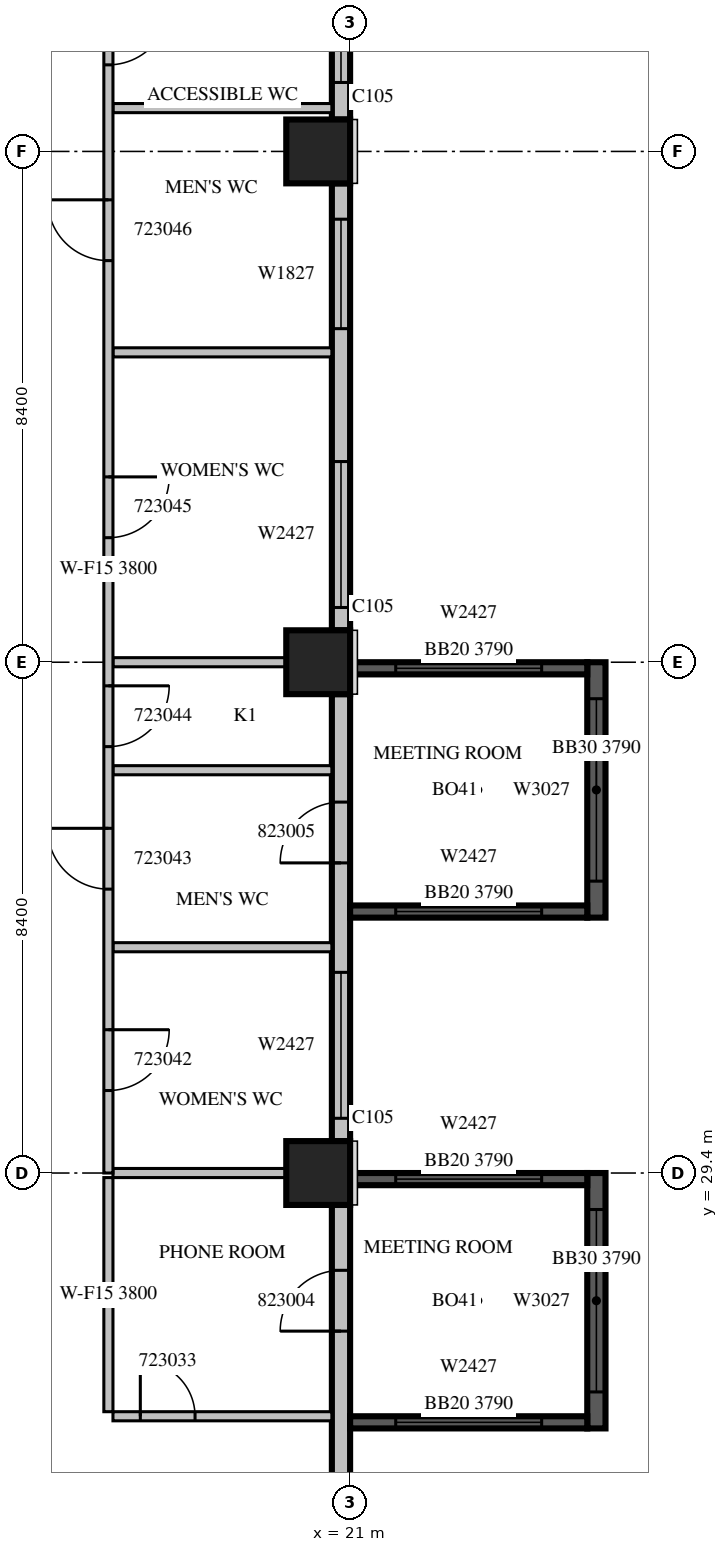
"""IFC4 building model, lengths in metres.
Left out: names, types, materials, properties, quantities, classifications, styles, units other than length and angle.
Written with IfcOpenShell. Run it as: python <this file> out.ifc"""

import sys

from ifc_helpers import new_model, si_unit, direction, frame, frame_2d, origin, origin_2d, place, context, subcontext, project, spatial, rectangle, extrude, source, transform, mapped, element, fill, save


model = new_model("IFC4")
c1 = context("Model", 3, precision=1e-05, world=origin(), true_north=direction((0.0, 1.0)))
c2 = subcontext(c1, "Body", "Model", "MODEL_VIEW")
j1 = project(units=[si_unit("LENGTHUNIT", "METRE"), si_unit("PLANEANGLEUNIT", "RADIAN")], contexts=[c1])
p1 = place(None, origin())
s1 = spatial("IfcSite", under=j1, at=p1, CompositionType="ELEMENT")
p2 = place(p1, origin())
s2 = spatial("IfcBuilding", under=s1, at=p2, CompositionType="ELEMENT")
p3 = place(p2, frame((0.0, 0.0, 107.7)))
s3 = spatial("IfcBuildingStorey", under=s2, at=p3, CompositionType="ELEMENT", Elevation=107.7)
m1 = source(origin(), c2, "Body", "SweptSolid", [
    extrude(rectangle(XDim=1.05, YDim=1.05, at=origin_2d()), origin(), (0.0, 0.0, 1.0), 4.2),
])
for number, where, z_axis, x_axis in (
    (1, (20.475, 29.4, 0.0), (0.0, 0.0, 1.0), (1.0, 0.0, 0.0)),
    (2, (20.475, 37.8, 0.0), (0.0, 0.0, 1.0), (1.0, 0.0, 0.0)),
    (3, (20.475, 46.2, 0.0), (0.0, 0.0, 1.0), (1.0, 0.0, 0.0)),
):
    element("IfcColumn", number, at=place(p3, frame(where, z_axis=z_axis, x_axis=x_axis)), inside=s3, PredefinedType="COLUMN", context=c2, shape_type="MappedRepresentation", body=[
        mapped(m1, transform((0.0, 0.0, 0.0), scale=1.0)),
    ])
m2 = source(origin(), c2, "Body", "SweptSolid", [
    extrude(rectangle(XDim=6.875, YDim=0.3, at=frame_2d((3.438, 0.0))), origin(), (0.0, 0.0, 1.0), 3.8),
])
p4 = place(p3, frame((20.85, 22.0, 0.0), z_axis=(0.0, 0.0, 1.0), x_axis=(0.0, 1.0, 0.0)))
e4 = element("IfcWall", 4, at=p4, inside=s3, PredefinedType="STANDARD", context=c2, shape_type="MappedRepresentation", body=[
    mapped(m2, transform((0.0, 0.0, 0.0), scale=1.0)),
])
m3 = source(origin(), c2, "Body", "SweptSolid", [
    extrude(rectangle(XDim=1.8, YDim=2.7, at=frame_2d((0.9, 1.35))), frame((0.0, 0.16, 0.0), z_axis=(0.0, -1.0, 0.0), x_axis=(1.0, 0.0, 0.0)), (0.0, 0.0, 1.0), 0.32),
])
p5 = place(p4, frame((0.2, 0.0, 0.6)))
e5 = element("IfcOpeningElement", 5, at=p5, cuts=e4, PredefinedType="OPENING", context=c2, shape_type="MappedRepresentation", body=[
    mapped(m3, transform((0.0, 0.0, 0.0), scale=1.0)),
])
m4 = source(origin(), c2, "Body", "SweptSolid", [
    extrude(rectangle(XDim=1.0, YDim=2.1, at=frame_2d((0.5, 1.05))), frame((0.0, 0.16, 0.0), z_axis=(0.0, -1.0, 0.0), x_axis=(1.0, 0.0, 0.0)), (0.0, 0.0, 1.0), 0.32),
])
p6 = place(p4, frame((4.8, 0.0, 0.0)))
e6 = element("IfcOpeningElement", 6, at=p6, cuts=e4, PredefinedType="OPENING", context=c2, shape_type="MappedRepresentation", body=[
    mapped(m4, transform((0.0, 0.0, 0.0), scale=1.0)),
])
m5 = source(origin(), c2, "Body", "SweptSolid", [
    extrude(rectangle(XDim=7.35, YDim=0.3, at=frame_2d((3.675, 0.0))), origin(), (0.0, 0.0, 1.0), 3.8),
])
p7 = place(p3, frame((20.85, 29.925, 0.0), z_axis=(0.0, 0.0, 1.0), x_axis=(0.0, 1.0, 0.0)))
e7 = element("IfcWall", 7, at=p7, inside=s3, PredefinedType="STANDARD", context=c2, shape_type="MappedRepresentation", body=[
    mapped(m5, transform((0.0, 0.0, 0.0), scale=1.0)),
])
m6 = source(origin(), c2, "Body", "SweptSolid", [
    extrude(rectangle(XDim=2.4, YDim=2.7, at=frame_2d((1.2, 1.35))), frame((0.0, 0.16, 0.0), z_axis=(0.0, -1.0, 0.0), x_axis=(1.0, 0.0, 0.0)), (0.0, 0.0, 1.0), 0.32),
])
p8 = place(p7, frame((0.375, 0.0, 0.6)))
e8 = element("IfcOpeningElement", 8, at=p8, cuts=e7, PredefinedType="OPENING", context=c2, shape_type="MappedRepresentation", body=[
    mapped(m6, transform((0.0, 0.0, 0.0), scale=1.0)),
])
p9 = place(p7, frame((4.575, 0.0, 0.0)))
e9 = element("IfcOpeningElement", 9, at=p9, cuts=e7, PredefinedType="OPENING", context=c2, shape_type="MappedRepresentation", body=[
    mapped(m4, transform((0.0, 0.0, 0.0), scale=1.0)),
])
p10 = place(p3, frame((20.85, 38.325, 0.0), z_axis=(0.0, 0.0, 1.0), x_axis=(0.0, 1.0, 0.0)))
e10 = element("IfcWall", 10, at=p10, inside=s3, PredefinedType="STANDARD", context=c2, shape_type="MappedRepresentation", body=[
    mapped(m5, transform((0.0, 0.0, 0.0), scale=1.0)),
])
p11 = place(p10, frame((0.375, 0.0, 0.6)))
e11 = element("IfcOpeningElement", 11, at=p11, cuts=e10, PredefinedType="OPENING", context=c2, shape_type="MappedRepresentation", body=[
    mapped(m6, transform((0.0, 0.0, 0.0), scale=1.0)),
])
p12 = place(p10, frame((4.96, 0.0, 0.6)))
e12 = element("IfcOpeningElement", 12, at=p12, cuts=e10, PredefinedType="OPENING", context=c2, shape_type="MappedRepresentation", body=[
    mapped(m3, transform((0.0, 0.0, 0.0), scale=1.0)),
])
m7 = source(origin(), c2, "Body", "SweptSolid", [
    extrude(rectangle(XDim=2.835, YDim=0.3, at=frame_2d((1.417, 0.0))), origin(), (0.0, 0.0, 1.0), 3.8),
])
p13 = place(p3, frame((20.85, 46.725, 0.0), z_axis=(0.0, 0.0, 1.0), x_axis=(0.0, 1.0, 0.0)))
e13 = element("IfcWall", 13, at=p13, inside=s3, PredefinedType="STANDARD", context=c2, shape_type="MappedRepresentation", body=[
    mapped(m7, transform((0.0, 0.0, 0.0), scale=1.0)),
])
m8 = source(origin(), c2, "Body", "SweptSolid", [
    extrude(rectangle(XDim=1.2, YDim=2.7, at=frame_2d((0.6, 1.35))), frame((0.0, 0.16, 0.0), z_axis=(0.0, -1.0, 0.0), x_axis=(1.0, 0.0, 0.0)), (0.0, 0.0, 1.0), 0.32),
])
p14 = place(p13, frame((0.609, 0.0, 0.6)))
e14 = element("IfcOpeningElement", 14, at=p14, cuts=e13, PredefinedType="OPENING", context=c2, shape_type="MappedRepresentation", body=[
    mapped(m8, transform((0.0, 0.0, 0.0), scale=1.0)),
])
m9 = source(origin(), c2, "Body", "SweptSolid", [
    extrude(rectangle(XDim=4.2, YDim=0.3, at=frame_2d((2.1, 0.0))), origin(), (0.0, 0.0, 1.0), 3.79),
])
p15 = place(p3, frame((25.05, 25.2, 0.0), z_axis=(0.0, 0.0, 1.0), x_axis=(0.0, 1.0, 0.0)))
e15 = element("IfcWall", 15, at=p15, inside=s3, PredefinedType="SOLIDWALL", context=c2, shape_type="MappedRepresentation", body=[
    mapped(m9, transform((0.0, 0.0, 0.0), scale=1.0)),
])
m10 = source(origin(), c2, "Body", "SweptSolid", [
    extrude(rectangle(XDim=3.0, YDim=2.7, at=frame_2d((1.5, 1.35))), frame((0.0, 0.16, 0.0), z_axis=(0.0, -1.0, 0.0), x_axis=(1.0, 0.0, 0.0)), (0.0, 0.0, 1.0), 0.32),
])
p16 = place(p15, frame((0.6, 0.0, 0.6)))
e16 = element("IfcOpeningElement", 16, at=p16, cuts=e15, PredefinedType="OPENING", context=c2, shape_type="MappedRepresentation", body=[
    mapped(m10, transform((0.0, 0.0, 0.0), scale=1.0)),
])
m11 = source(origin(), c2, "Body", "SweptSolid", [
    extrude(rectangle(XDim=3.9, YDim=0.2, at=frame_2d((1.95, 0.0))), origin(), (0.0, 0.0, 1.0), 3.79),
])
p17 = place(p3, frame((21.0, 25.3, 0.0), z_axis=(0.0, 0.0, 1.0), x_axis=(1.0, 0.0, 0.0)))
e17 = element("IfcWall", 17, at=p17, inside=s3, PredefinedType="SOLIDWALL", context=c2, shape_type="MappedRepresentation", body=[
    mapped(m11, transform((0.0, 0.0, 0.0), scale=1.0)),
])
m12 = source(origin(), c2, "Body", "SweptSolid", [
    extrude(rectangle(XDim=2.4, YDim=2.7, at=frame_2d((1.2, 1.35))), frame((0.0, 0.11, 0.0), z_axis=(0.0, -1.0, 0.0), x_axis=(1.0, 0.0, 0.0)), (0.0, 0.0, 1.0), 0.22),
])
p18 = place(p17, frame((0.75, 0.0, 0.6)))
e18 = element("IfcOpeningElement", 18, at=p18, cuts=e17, PredefinedType="OPENING", context=c2, shape_type="MappedRepresentation", body=[
    mapped(m12, transform((0.0, 0.0, 0.0), scale=1.0)),
])
p19 = place(p3, frame((21.0, 29.3, 0.0), z_axis=(0.0, 0.0, 1.0), x_axis=(1.0, 0.0, 0.0)))
e19 = element("IfcWall", 19, at=p19, inside=s3, PredefinedType="SOLIDWALL", context=c2, shape_type="MappedRepresentation", body=[
    mapped(m11, transform((0.0, 0.0, 0.0), scale=1.0)),
])
p20 = place(p19, frame((0.75, 0.0, 0.6)))
e20 = element("IfcOpeningElement", 20, at=p20, cuts=e19, PredefinedType="OPENING", context=c2, shape_type="MappedRepresentation", body=[
    mapped(m12, transform((0.0, 0.0, 0.0), scale=1.0)),
])
p21 = place(p3, frame((25.05, 33.6, 0.0), z_axis=(0.0, 0.0, 1.0), x_axis=(0.0, 1.0, 0.0)))
e21 = element("IfcWall", 21, at=p21, inside=s3, PredefinedType="SOLIDWALL", context=c2, shape_type="MappedRepresentation", body=[
    mapped(m9, transform((0.0, 0.0, 0.0), scale=1.0)),
])
p22 = place(p21, frame((0.6, 0.0, 0.6)))
e22 = element("IfcOpeningElement", 22, at=p22, cuts=e21, PredefinedType="OPENING", context=c2, shape_type="MappedRepresentation", body=[
    mapped(m10, transform((0.0, 0.0, 0.0), scale=1.0)),
])
p23 = place(p3, frame((21.0, 33.7, 0.0), z_axis=(0.0, 0.0, 1.0), x_axis=(1.0, 0.0, 0.0)))
e23 = element("IfcWall", 23, at=p23, inside=s3, PredefinedType="SOLIDWALL", context=c2, shape_type="MappedRepresentation", body=[
    mapped(m11, transform((0.0, 0.0, 0.0), scale=1.0)),
])
p24 = place(p23, frame((0.75, 0.0, 0.6)))
e24 = element("IfcOpeningElement", 24, at=p24, cuts=e23, PredefinedType="OPENING", context=c2, shape_type="MappedRepresentation", body=[
    mapped(m12, transform((0.0, 0.0, 0.0), scale=1.0)),
])
p25 = place(p3, frame((21.0, 37.7, 0.0), z_axis=(0.0, 0.0, 1.0), x_axis=(1.0, 0.0, 0.0)))
e25 = element("IfcWall", 25, at=p25, inside=s3, PredefinedType="SOLIDWALL", context=c2, shape_type="MappedRepresentation", body=[
    mapped(m11, transform((0.0, 0.0, 0.0), scale=1.0)),
])
p26 = place(p25, frame((0.75, 0.0, 0.6)))
e26 = element("IfcOpeningElement", 26, at=p26, cuts=e25, PredefinedType="OPENING", context=c2, shape_type="MappedRepresentation", body=[
    mapped(m12, transform((0.0, 0.0, 0.0), scale=1.0)),
])
m13 = source(origin(), c2, "Body", "SweptSolid", [
    extrude(rectangle(XDim=3.6, YDim=0.15, at=frame_2d((1.8, 0.0))), origin(), (0.0, 0.0, 1.0), 3.8),
])
p27 = place(p3, frame((17.1, 25.4, 0.0), z_axis=(0.0, 0.0, 1.0), x_axis=(1.0, 0.0, 0.0)))
e27 = element("IfcWall", 27, at=p27, inside=s3, PredefinedType="PARTITIONING", context=c2, shape_type="MappedRepresentation", body=[
    mapped(m13, transform((0.0, 0.0, 0.0), scale=1.0)),
])
m14 = source(origin(), c2, "Body", "SweptSolid", [
    extrude(rectangle(XDim=0.9, YDim=2.1, at=frame_2d((0.45, 1.05))), frame((0.0, 0.085, 0.0), z_axis=(0.0, -1.0, 0.0), x_axis=(1.0, 0.0, 0.0)), (0.0, 0.0, 1.0), 0.17),
])
p28 = place(p27, frame((0.45, 0.0, 0.0)))
e28 = element("IfcOpeningElement", 28, at=p28, cuts=e27, PredefinedType="OPENING", context=c2, shape_type="MappedRepresentation", body=[
    mapped(m14, transform((0.0, 0.0, 0.0), scale=1.0)),
])
m15 = source(origin(), c2, "Body", "SweptSolid", [
    extrude(rectangle(XDim=3.85, YDim=0.15, at=frame_2d((1.925, 0.0))), origin(), (0.0, 0.0, 1.0), 3.8),
])
p29 = place(p3, frame((17.025, 29.325, 0.0), z_axis=(0.0, 0.0, 1.0), x_axis=(0.0, -1.0, 0.0)))
e29 = element("IfcWall", 29, at=p29, inside=s3, PredefinedType="PARTITIONING", context=c2, shape_type="MappedRepresentation", body=[
    mapped(m15, transform((0.0, 0.0, 0.0), scale=1.0)),
])
m16 = source(origin(), c2, "Body", "SweptSolid", [
    extrude(rectangle(XDim=2.851, YDim=0.15, at=frame_2d((1.425, 0.0))), origin(), (0.0, 0.0, 1.0), 3.8),
])
p30 = place(p3, frame((19.951, 29.4, 0.0), z_axis=(0.0, 0.0, 1.0), x_axis=(-1.0, 0.0, 0.0)))
e30 = element("IfcWall", 30, at=p30, inside=s3, PredefinedType="PARTITIONING", context=c2, shape_type="MappedRepresentation", body=[
    mapped(m16, transform((0.0, 0.0, 0.0), scale=1.0)),
])
for number, where, z_axis, x_axis in (
    (31, (17.1, 33.113, 0.0), (0.0, 0.0, 1.0), (1.0, 0.0, 0.0)),
    (32, (17.1, 36.024, 0.0), (0.0, 0.0, 1.0), (1.0, 0.0, 0.0)),
    (33, (17.1, 42.896, 0.0), (0.0, 0.0, 1.0), (1.0, 0.0, 0.0)),
    (34, (17.1, 46.913, 0.0), (0.0, 0.0, 1.0), (1.0, 0.0, 0.0)),
):
    element("IfcWall", number, at=place(p3, frame(where, z_axis=z_axis, x_axis=x_axis)), inside=s3, PredefinedType="PARTITIONING", context=c2, shape_type="MappedRepresentation", body=[
        mapped(m13, transform((0.0, 0.0, 0.0), scale=1.0)),
    ])
p31 = place(p3, frame((19.951, 37.8, 0.0), z_axis=(0.0, 0.0, 1.0), x_axis=(-1.0, 0.0, 0.0)))
e35 = element("IfcWall", 35, at=p31, inside=s3, PredefinedType="PARTITIONING", context=c2, shape_type="MappedRepresentation", body=[
    mapped(m16, transform((0.0, 0.0, 0.0), scale=1.0)),
])
m17 = source(origin(), c2, "Body", "SweptSolid", [
    extrude(rectangle(XDim=19.86, YDim=0.15, at=frame_2d((9.93, 0.0))), origin(), (0.0, 0.0, 1.0), 3.8),
])
p32 = place(p3, frame((17.025, 49.26, 0.0), z_axis=(0.0, 0.0, 1.0), x_axis=(0.0, -1.0, 0.0)))
e36 = element("IfcWall", 36, at=p32, inside=s3, PredefinedType="PARTITIONING", context=c2, shape_type="MappedRepresentation", body=[
    mapped(m17, transform((0.0, 0.0, 0.0), scale=1.0)),
])
m18 = source(origin(), c2, "Body", "SweptSolid", [
    extrude(rectangle(XDim=1.0, YDim=2.1, at=frame_2d((0.5, 1.05))), frame((0.0, 0.085, 0.0), z_axis=(0.0, -1.0, 0.0), x_axis=(1.0, 0.0, 0.0)), (0.0, 0.0, 1.0), 0.17),
])
p33 = place(p32, frame((17.503, 0.0, 0.0)))
e37 = element("IfcOpeningElement", 37, at=p33, cuts=e36, PredefinedType="OPENING", context=c2, shape_type="MappedRepresentation", body=[
    mapped(m18, transform((0.0, 0.0, 0.0), scale=1.0)),
])
p34 = place(p32, frame((14.191, 0.0, 0.0)))
e38 = element("IfcOpeningElement", 38, at=p34, cuts=e36, PredefinedType="OPENING", context=c2, shape_type="MappedRepresentation", body=[
    mapped(m18, transform((0.0, 0.0, 0.0), scale=1.0)),
])
p35 = place(p32, frame((11.848, 0.0, 0.0)))
e39 = element("IfcOpeningElement", 39, at=p35, cuts=e36, PredefinedType="OPENING", context=c2, shape_type="MappedRepresentation", body=[
    mapped(m18, transform((0.0, 0.0, 0.0), scale=1.0)),
])
p36 = place(p32, frame((8.412, 0.0, 0.0)))
e40 = element("IfcOpeningElement", 40, at=p36, cuts=e36, PredefinedType="OPENING", context=c2, shape_type="MappedRepresentation", body=[
    mapped(m18, transform((0.0, 0.0, 0.0), scale=1.0)),
])
p37 = place(p32, frame((3.856, 0.0, 0.0)))
e41 = element("IfcOpeningElement", 41, at=p37, cuts=e36, PredefinedType="OPENING", context=c2, shape_type="MappedRepresentation", body=[
    mapped(m18, transform((0.0, 0.0, 0.0), scale=1.0)),
])
p38 = place(p32, frame((0.636, 0.0, 0.0)))
e42 = element("IfcOpeningElement", 42, at=p38, cuts=e36, PredefinedType="OPENING", context=c2, shape_type="MappedRepresentation", body=[
    mapped(m18, transform((0.0, 0.0, 0.0), scale=1.0)),
])
m19 = source(origin(), c2, "Body", "SweptSolid", [
    extrude(rectangle(XDim=2.4, YDim=2.7, at=frame_2d((1.2, 1.35))), frame((0.0, 0.03, 0.0), z_axis=(0.0, -1.0, 0.0), x_axis=(1.0, 0.0, 0.0)), (0.0, 0.0, 1.0), 0.06),
])
p39 = place(p8, origin())
e43 = element("IfcWindow", 43, at=p39, inside=s3, PartitioningType="SINGLE_PANEL", PredefinedType="WINDOW", context=c2, shape_type="MappedRepresentation", body=[
    mapped(m19, transform((0.0, 0.0, 0.0), scale=1.0)),
])
fill(e8, e43)
p40 = place(p11, origin())
e44 = element("IfcWindow", 44, at=p40, inside=s3, PartitioningType="SINGLE_PANEL", PredefinedType="WINDOW", context=c2, shape_type="MappedRepresentation", body=[
    mapped(m19, transform((0.0, 0.0, 0.0), scale=1.0)),
])
fill(e11, e44)
m20 = source(origin(), c2, "Body", "SweptSolid", [
    extrude(rectangle(XDim=1.8, YDim=2.7, at=frame_2d((0.9, 1.35))), frame((0.0, 0.03, 0.0), z_axis=(0.0, -1.0, 0.0), x_axis=(1.0, 0.0, 0.0)), (0.0, 0.0, 1.0), 0.06),
])
p41 = place(p12, origin())
e45 = element("IfcWindow", 45, at=p41, inside=s3, PartitioningType="SINGLE_PANEL", PredefinedType="WINDOW", context=c2, shape_type="MappedRepresentation", body=[
    mapped(m20, transform((0.0, 0.0, 0.0), scale=1.0)),
])
fill(e12, e45)
m21 = source(origin(), c2, "Body", "SweptSolid", [
    extrude(rectangle(XDim=1.2, YDim=2.7, at=frame_2d((0.6, 1.35))), frame((0.0, 0.03, 0.0), z_axis=(0.0, -1.0, 0.0), x_axis=(1.0, 0.0, 0.0)), (0.0, 0.0, 1.0), 0.06),
])
p42 = place(p14, origin())
e46 = element("IfcWindow", 46, at=p42, inside=s3, PartitioningType="SINGLE_PANEL", PredefinedType="WINDOW", context=c2, shape_type="MappedRepresentation", body=[
    mapped(m21, transform((0.0, 0.0, 0.0), scale=1.0)),
])
fill(e14, e46)
m22 = source(origin(), c2, "Body", "SweptSolid", [
    extrude(rectangle(XDim=3.0, YDim=2.7, at=frame_2d((1.5, 1.35))), frame((0.0, 0.03, 0.0), z_axis=(0.0, -1.0, 0.0), x_axis=(1.0, 0.0, 0.0)), (0.0, 0.0, 1.0), 0.06),
])
p43 = place(p16, origin())
e47 = element("IfcWindow", 47, at=p43, inside=s3, PartitioningType="SINGLE_PANEL", PredefinedType="WINDOW", context=c2, shape_type="MappedRepresentation", body=[
    mapped(m22, transform((0.0, 0.0, 0.0), scale=1.0)),
])
fill(e16, e47)
p44 = place(p18, origin())
e48 = element("IfcWindow", 48, at=p44, inside=s3, PartitioningType="SINGLE_PANEL", PredefinedType="WINDOW", context=c2, shape_type="MappedRepresentation", body=[
    mapped(m19, transform((0.0, 0.0, 0.0), scale=1.0)),
])
fill(e18, e48)
p45 = place(p20, origin())
e49 = element("IfcWindow", 49, at=p45, inside=s3, PartitioningType="SINGLE_PANEL", PredefinedType="WINDOW", context=c2, shape_type="MappedRepresentation", body=[
    mapped(m19, transform((0.0, 0.0, 0.0), scale=1.0)),
])
fill(e20, e49)
p46 = place(p22, origin())
e50 = element("IfcWindow", 50, at=p46, inside=s3, PartitioningType="SINGLE_PANEL", PredefinedType="WINDOW", context=c2, shape_type="MappedRepresentation", body=[
    mapped(m22, transform((0.0, 0.0, 0.0), scale=1.0)),
])
fill(e22, e50)
p47 = place(p24, origin())
e51 = element("IfcWindow", 51, at=p47, inside=s3, PartitioningType="SINGLE_PANEL", PredefinedType="WINDOW", context=c2, shape_type="MappedRepresentation", body=[
    mapped(m19, transform((0.0, 0.0, 0.0), scale=1.0)),
])
fill(e24, e51)
p48 = place(p26, origin())
e52 = element("IfcWindow", 52, at=p48, inside=s3, PartitioningType="SINGLE_PANEL", PredefinedType="WINDOW", context=c2, shape_type="MappedRepresentation", body=[
    mapped(m19, transform((0.0, 0.0, 0.0), scale=1.0)),
])
fill(e26, e52)
m23 = source(origin(), c2, "Body", "SweptSolid", [
    extrude(rectangle(XDim=0.9, YDim=2.1, at=frame_2d((0.45, 1.05))), frame((0.0, 0.025, 0.0), z_axis=(0.0, -1.0, 0.0), x_axis=(1.0, 0.0, 0.0)), (0.0, 0.0, 1.0), 0.05),
])
p49 = place(p28, origin())
e53 = element("IfcDoor", 53, at=p49, inside=s3, OperationType="SINGLE_SWING_LEFT", PredefinedType="DOOR", context=c2, shape_type="MappedRepresentation", body=[
    mapped(m23, transform((0.0, 0.0, 0.0), scale=1.0)),
])
fill(e28, e53)
m24 = source(origin(), c2, "Body", "SweptSolid", [
    extrude(rectangle(XDim=1.0, YDim=2.1, at=frame_2d((0.5, 1.05))), frame((0.0, 0.025, 0.0), z_axis=(0.0, -1.0, 0.0), x_axis=(1.0, 0.0, 0.0)), (0.0, 0.0, 1.0), 0.05),
])
p50 = place(p33, origin())
e54 = element("IfcDoor", 54, at=p50, inside=s3, OperationType="SINGLE_SWING_LEFT", PredefinedType="DOOR", context=c2, shape_type="MappedRepresentation", body=[
    mapped(m24, transform((0.0, 0.0, 0.0), scale=1.0)),
])
fill(e37, e54)
p51 = place(p34, origin())
e55 = element("IfcDoor", 55, at=p51, inside=s3, OperationType="SINGLE_SWING_RIGHT", PredefinedType="DOOR", context=c2, shape_type="MappedRepresentation", body=[
    mapped(m24, transform((0.0, 0.0, 0.0), scale=1.0)),
])
fill(e38, e55)
p52 = place(p35, origin())
e56 = element("IfcDoor", 56, at=p52, inside=s3, OperationType="SINGLE_SWING_LEFT", PredefinedType="DOOR", context=c2, shape_type="MappedRepresentation", body=[
    mapped(m24, transform((0.0, 0.0, 0.0), scale=1.0)),
])
fill(e39, e56)
p53 = place(p36, origin())
e57 = element("IfcDoor", 57, at=p53, inside=s3, OperationType="SINGLE_SWING_LEFT", PredefinedType="DOOR", context=c2, shape_type="MappedRepresentation", body=[
    mapped(m24, transform((0.0, 0.0, 0.0), scale=1.0)),
])
fill(e40, e57)
p54 = place(p37, origin())
e58 = element("IfcDoor", 58, at=p54, inside=s3, OperationType="SINGLE_SWING_RIGHT", PredefinedType="DOOR", context=c2, shape_type="MappedRepresentation", body=[
    mapped(m24, transform((0.0, 0.0, 0.0), scale=1.0)),
])
fill(e41, e58)
p55 = place(p38, origin())
e59 = element("IfcDoor", 59, at=p55, inside=s3, OperationType="SINGLE_SWING_LEFT", PredefinedType="DOOR", context=c2, shape_type="MappedRepresentation", body=[
    mapped(m24, transform((0.0, 0.0, 0.0), scale=1.0)),
])
fill(e42, e59)
p56 = place(p6, origin())
e60 = element("IfcDoor", 60, at=p56, inside=s3, OperationType="SINGLE_SWING_LEFT", PredefinedType="DOOR", context=c2, shape_type="MappedRepresentation", body=[
    mapped(m24, transform((0.0, 0.0, 0.0), scale=1.0)),
])
fill(e6, e60)
p57 = place(p9, origin())
e61 = element("IfcDoor", 61, at=p57, inside=s3, OperationType="SINGLE_SWING_LEFT", PredefinedType="DOOR", context=c2, shape_type="MappedRepresentation", body=[
    mapped(m24, transform((0.0, 0.0, 0.0), scale=1.0)),
])
fill(e9, e61)
save(model, sys.argv[1])
